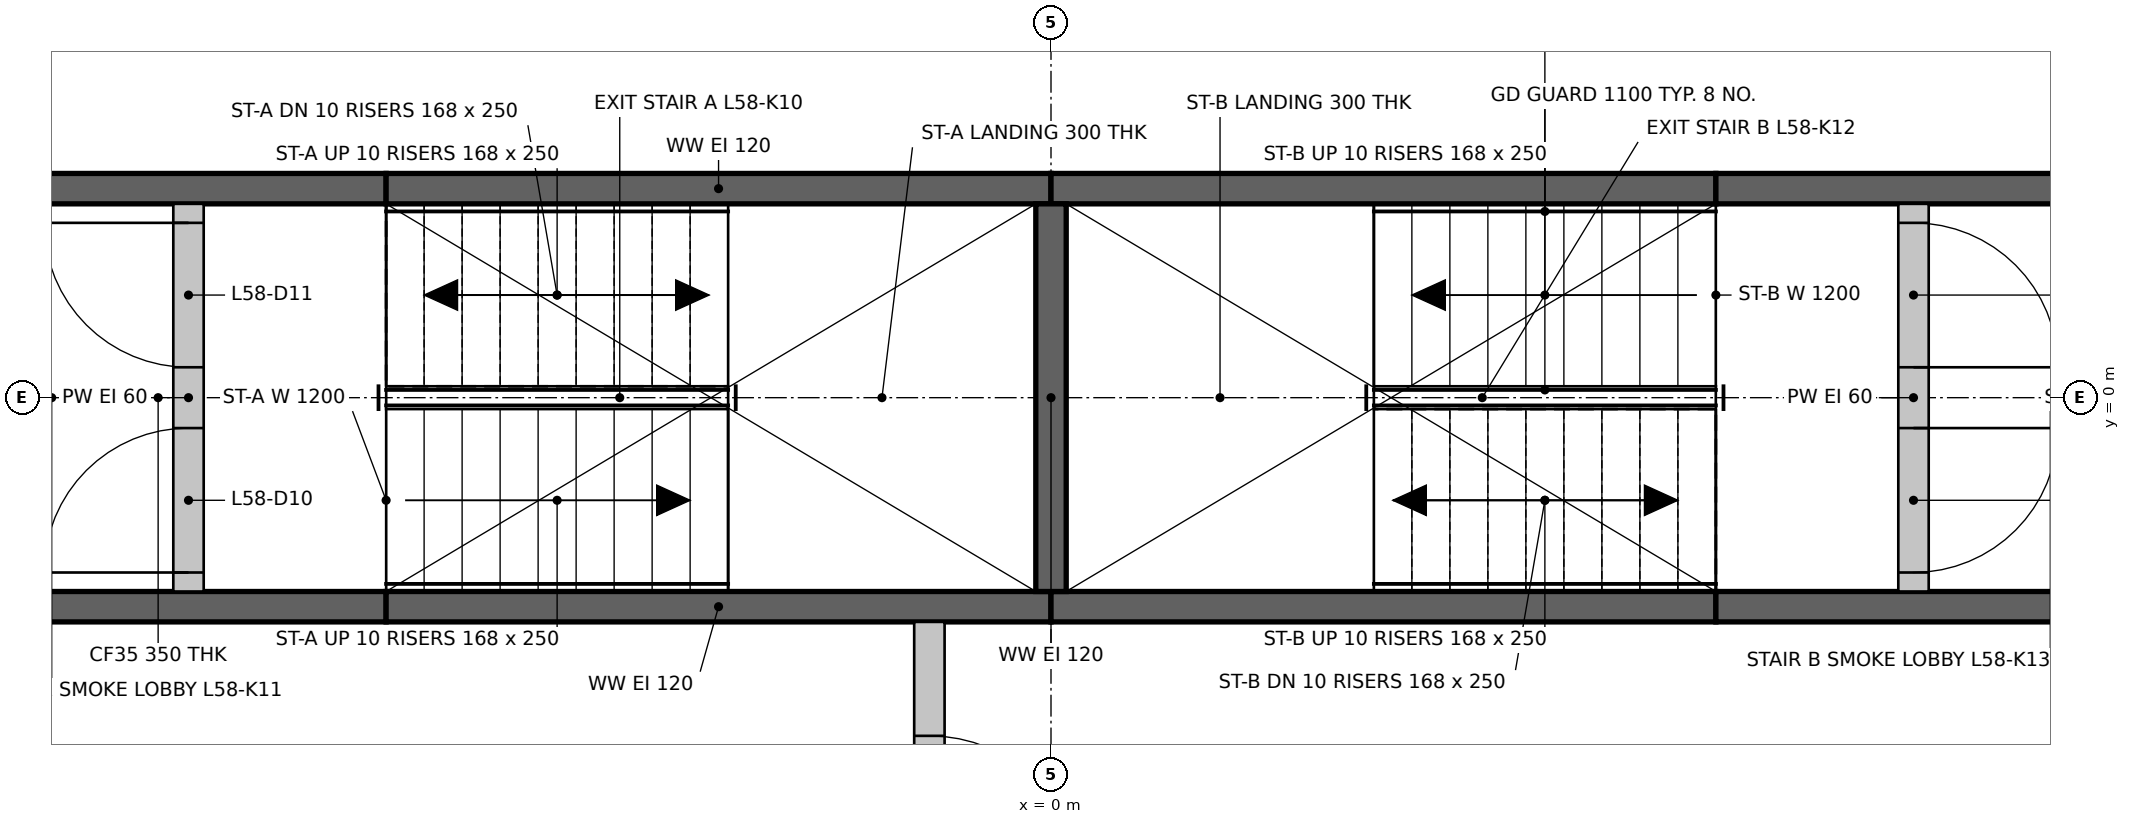
"""IFC4 building model, lengths in metres.
Left out: names, types, materials, properties, quantities, classifications, styles, units other than length and angle.
Written with IfcOpenShell. Run it as: python <this file> out.ifc"""

import sys

from ifc_helpers import new_model, si_unit, direction, frame, frame_2d, origin, place, context, subcontext, project, spatial, rectangle, extrude, element, fill, save


model = new_model("IFC4")
c1 = context("Model", 3, precision=1e-05, world=origin(), true_north=direction((0.0, 1.0)))
c2 = subcontext(c1, "Body", "Model", "MODEL_VIEW")
j1 = project(units=[si_unit("LENGTHUNIT", "METRE"), si_unit("PLANEANGLEUNIT", "RADIAN")], contexts=[c1])
p1 = place(None, origin())
s1 = spatial("IfcSite", under=j1, at=p1, CompositionType="ELEMENT")
p2 = place(p1, origin())
s2 = spatial("IfcBuilding", under=s1, at=p2, CompositionType="ELEMENT")
p3 = place(p2, frame((0.0, 0.0, 214.45)))
s3 = spatial("IfcBuildingStorey", under=s2, at=p3, CompositionType="ELEMENT", Elevation=214.45)
p4 = place(p3, frame((-7.374, -1.375, 0.0), z_axis=(0.0, 0.0, 1.0), x_axis=(1.0, 0.0, 0.0)))
e1 = element("IfcWall", 1, at=p4, inside=s3, PredefinedType="SHEAR", context=c2, shape_type="SweptSolid", body=[
    extrude(rectangle(XDim=3.0, YDim=0.2, at=frame_2d((1.5, 0.0))), origin(), (0.0, 0.0, 1.0), 3.0),
])
for number, where, z_axis, x_axis in (
    (2, (-4.374, -1.375, 0.0), (0.0, 0.0, 1.0), (1.0, 0.0, 0.0)),
    (3, (0.0, -1.375, 0.0), (0.0, 0.0, 1.0), (1.0, 0.0, 0.0)),
):
    element("IfcWall", number, at=place(p3, frame(where, z_axis=z_axis, x_axis=x_axis)), inside=s3, PredefinedType="SHEAR", context=c2, shape_type="SweptSolid", body=[
        extrude(rectangle(XDim=4.374, YDim=0.2, at=frame_2d((2.187, 0.0))), origin(), (0.0, 0.0, 1.0), 3.0),
    ])
for number, where, z_axis, x_axis in (
    (4, (4.374, -1.375, 0.0), (0.0, 0.0, 1.0), (1.0, 0.0, 0.0)),
    (5, (-7.374, 1.375, 0.0), (0.0, 0.0, 1.0), (1.0, 0.0, 0.0)),
):
    element("IfcWall", number, at=place(p3, frame(where, z_axis=z_axis, x_axis=x_axis)), inside=s3, PredefinedType="SHEAR", context=c2, shape_type="SweptSolid", body=[
        extrude(rectangle(XDim=3.0, YDim=0.2, at=frame_2d((1.5, 0.0))), origin(), (0.0, 0.0, 1.0), 3.0),
    ])
for number, where, z_axis, x_axis in (
    (6, (-4.374, 1.375, 0.0), (0.0, 0.0, 1.0), (1.0, 0.0, 0.0)),
    (7, (0.0, 1.375, 0.0), (0.0, 0.0, 1.0), (1.0, 0.0, 0.0)),
):
    element("IfcWall", number, at=place(p3, frame(where, z_axis=z_axis, x_axis=x_axis)), inside=s3, PredefinedType="SHEAR", context=c2, shape_type="SweptSolid", body=[
        extrude(rectangle(XDim=4.374, YDim=0.2, at=frame_2d((2.187, 0.0))), origin(), (0.0, 0.0, 1.0), 3.0),
    ])
p5 = place(p3, frame((4.374, 1.375, 0.0), z_axis=(0.0, 0.0, 1.0), x_axis=(1.0, 0.0, 0.0)))
e8 = element("IfcWall", 8, at=p5, inside=s3, PredefinedType="SHEAR", context=c2, shape_type="SweptSolid", body=[
    extrude(rectangle(XDim=3.0, YDim=0.2, at=frame_2d((1.5, 0.0))), origin(), (0.0, 0.0, 1.0), 3.0),
])
p6 = place(p3, frame((0.0, -1.275, 0.0), z_axis=(0.0, 0.0, 1.0), x_axis=(0.0, 1.0, 0.0)))
e9 = element("IfcWall", 9, at=p6, inside=s3, PredefinedType="SHEAR", context=c2, shape_type="SweptSolid", body=[
    extrude(rectangle(XDim=2.55, YDim=0.2, at=frame_2d((1.275, 0.0))), origin(), (0.0, 0.0, 1.0), 3.0),
])
p7 = place(p3, frame((-0.8, -3.974, 0.0), z_axis=(0.0, 0.0, 1.0), x_axis=(0.0, 1.0, 0.0)))
e10 = element("IfcWall", 10, at=p7, inside=s3, PredefinedType="PARTITIONING", context=c2, shape_type="SweptSolid", body=[
    extrude(rectangle(XDim=2.499, YDim=0.2, at=frame_2d((1.25, 0.0))), origin(), (0.0, 0.0, 1.0), 3.0),
])
p8 = place(p7, frame((0.75, 0.0, 0.0)))
e11 = element("IfcOpeningElement", 11, at=p8, cuts=e10, PredefinedType="OPENING", context=c2, shape_type="SweptSolid", body=[
    extrude(rectangle(XDim=1.0, YDim=2.1, at=frame_2d((0.5, 1.05))), frame((0.0, 0.11, 0.0), z_axis=(0.0, -1.0, 0.0), x_axis=(1.0, 0.0, 0.0)), (0.0, 0.0, 1.0), 0.22),
])
p9 = place(p3, frame((-5.674, -1.275, 0.0), z_axis=(0.0, 0.0, 1.0), x_axis=(0.0, 1.0, 0.0)))
e12 = element("IfcWall", 12, at=p9, inside=s3, PredefinedType="PARTITIONING", context=c2, shape_type="SweptSolid", body=[
    extrude(rectangle(XDim=2.55, YDim=0.2, at=frame_2d((1.275, 0.0))), origin(), (0.0, 0.0, 1.0), 3.0),
])
p10 = place(p9, frame((0.125, 0.0, 0.0)))
e13 = element("IfcOpeningElement", 13, at=p10, cuts=e12, PredefinedType="OPENING", context=c2, shape_type="SweptSolid", body=[
    extrude(rectangle(XDim=0.95, YDim=2.1, at=frame_2d((0.475, 1.05))), frame((0.0, 0.11, 0.0), z_axis=(0.0, -1.0, 0.0), x_axis=(1.0, 0.0, 0.0)), (0.0, 0.0, 1.0), 0.22),
])
p11 = place(p9, frame((1.475, 0.0, 0.0)))
e14 = element("IfcOpeningElement", 14, at=p11, cuts=e12, PredefinedType="OPENING", context=c2, shape_type="SweptSolid", body=[
    extrude(rectangle(XDim=0.95, YDim=2.1, at=frame_2d((0.475, 1.05))), frame((0.0, 0.11, 0.0), z_axis=(0.0, -1.0, 0.0), x_axis=(1.0, 0.0, 0.0)), (0.0, 0.0, 1.0), 0.22),
])
p12 = place(p3, frame((5.674, -1.275, 0.0), z_axis=(0.0, 0.0, 1.0), x_axis=(0.0, 1.0, 0.0)))
e15 = element("IfcWall", 15, at=p12, inside=s3, PredefinedType="PARTITIONING", context=c2, shape_type="SweptSolid", body=[
    extrude(rectangle(XDim=2.55, YDim=0.2, at=frame_2d((1.275, 0.0))), origin(), (0.0, 0.0, 1.0), 3.0),
])
p13 = place(p12, frame((0.125, 0.0, 0.0)))
e16 = element("IfcOpeningElement", 16, at=p13, cuts=e15, PredefinedType="OPENING", context=c2, shape_type="SweptSolid", body=[
    extrude(rectangle(XDim=0.95, YDim=2.1, at=frame_2d((0.475, 1.05))), frame((0.0, 0.11, 0.0), z_axis=(0.0, -1.0, 0.0), x_axis=(1.0, 0.0, 0.0)), (0.0, 0.0, 1.0), 0.22),
])
p14 = place(p12, frame((1.475, 0.0, 0.0)))
e17 = element("IfcOpeningElement", 17, at=p14, cuts=e15, PredefinedType="OPENING", context=c2, shape_type="SweptSolid", body=[
    extrude(rectangle(XDim=0.95, YDim=2.1, at=frame_2d((0.475, 1.05))), frame((0.0, 0.11, 0.0), z_axis=(0.0, -1.0, 0.0), x_axis=(1.0, 0.0, 0.0)), (0.0, 0.0, 1.0), 0.22),
])
p15 = place(p10, origin())
e18 = element("IfcDoor", 18, at=p15, inside=s3, OperationType="SINGLE_SWING_LEFT", PredefinedType="DOOR", context=c2, shape_type="SweptSolid", body=[
    extrude(rectangle(XDim=0.95, YDim=2.1, at=frame_2d((0.475, 1.05))), frame((0.0, 0.025, 0.0), z_axis=(0.0, -1.0, 0.0), x_axis=(1.0, 0.0, 0.0)), (0.0, 0.0, 1.0), 0.05),
])
fill(e13, e18)
p16 = place(p11, origin())
e19 = element("IfcDoor", 19, at=p16, inside=s3, OperationType="SINGLE_SWING_RIGHT", PredefinedType="DOOR", context=c2, shape_type="SweptSolid", body=[
    extrude(rectangle(XDim=0.95, YDim=2.1, at=frame_2d((0.475, 1.05))), frame((0.0, 0.025, 0.0), z_axis=(0.0, -1.0, 0.0), x_axis=(1.0, 0.0, 0.0)), (0.0, 0.0, 1.0), 0.05),
])
fill(e14, e19)
p17 = place(p13, frame((0.95, 0.0, 0.0), z_axis=(0.0, 0.0, 1.0), x_axis=(-1.0, 0.0, 0.0)))
e20 = element("IfcDoor", 20, at=p17, inside=s3, OperationType="SINGLE_SWING_RIGHT", PredefinedType="DOOR", context=c2, shape_type="SweptSolid", body=[
    extrude(rectangle(XDim=0.95, YDim=2.1, at=frame_2d((0.475, 1.05))), frame((0.0, 0.025, 0.0), z_axis=(0.0, -1.0, 0.0), x_axis=(1.0, 0.0, 0.0)), (0.0, 0.0, 1.0), 0.05),
])
fill(e16, e20)
p18 = place(p14, frame((0.95, 0.0, 0.0), z_axis=(0.0, 0.0, 1.0), x_axis=(-1.0, 0.0, 0.0)))
e21 = element("IfcDoor", 21, at=p18, inside=s3, OperationType="SINGLE_SWING_LEFT", PredefinedType="DOOR", context=c2, shape_type="SweptSolid", body=[
    extrude(rectangle(XDim=0.95, YDim=2.1, at=frame_2d((0.475, 1.05))), frame((0.0, 0.025, 0.0), z_axis=(0.0, -1.0, 0.0), x_axis=(1.0, 0.0, 0.0)), (0.0, 0.0, 1.0), 0.05),
])
fill(e17, e21)
p19 = place(p8, frame((1.0, 0.0, 0.0), z_axis=(0.0, 0.0, 1.0), x_axis=(-1.0, 0.0, 0.0)))
e22 = element("IfcDoor", 22, at=p19, inside=s3, OperationType="SINGLE_SWING_LEFT", PredefinedType="DOOR", context=c2, shape_type="SweptSolid", body=[
    extrude(rectangle(XDim=1.0, YDim=2.1, at=frame_2d((0.5, 1.05))), frame((0.0, 0.025, 0.0), z_axis=(0.0, -1.0, 0.0), x_axis=(1.0, 0.0, 0.0)), (0.0, 0.0, 1.0), 0.05),
])
fill(e11, e22)
save(model, sys.argv[1])
